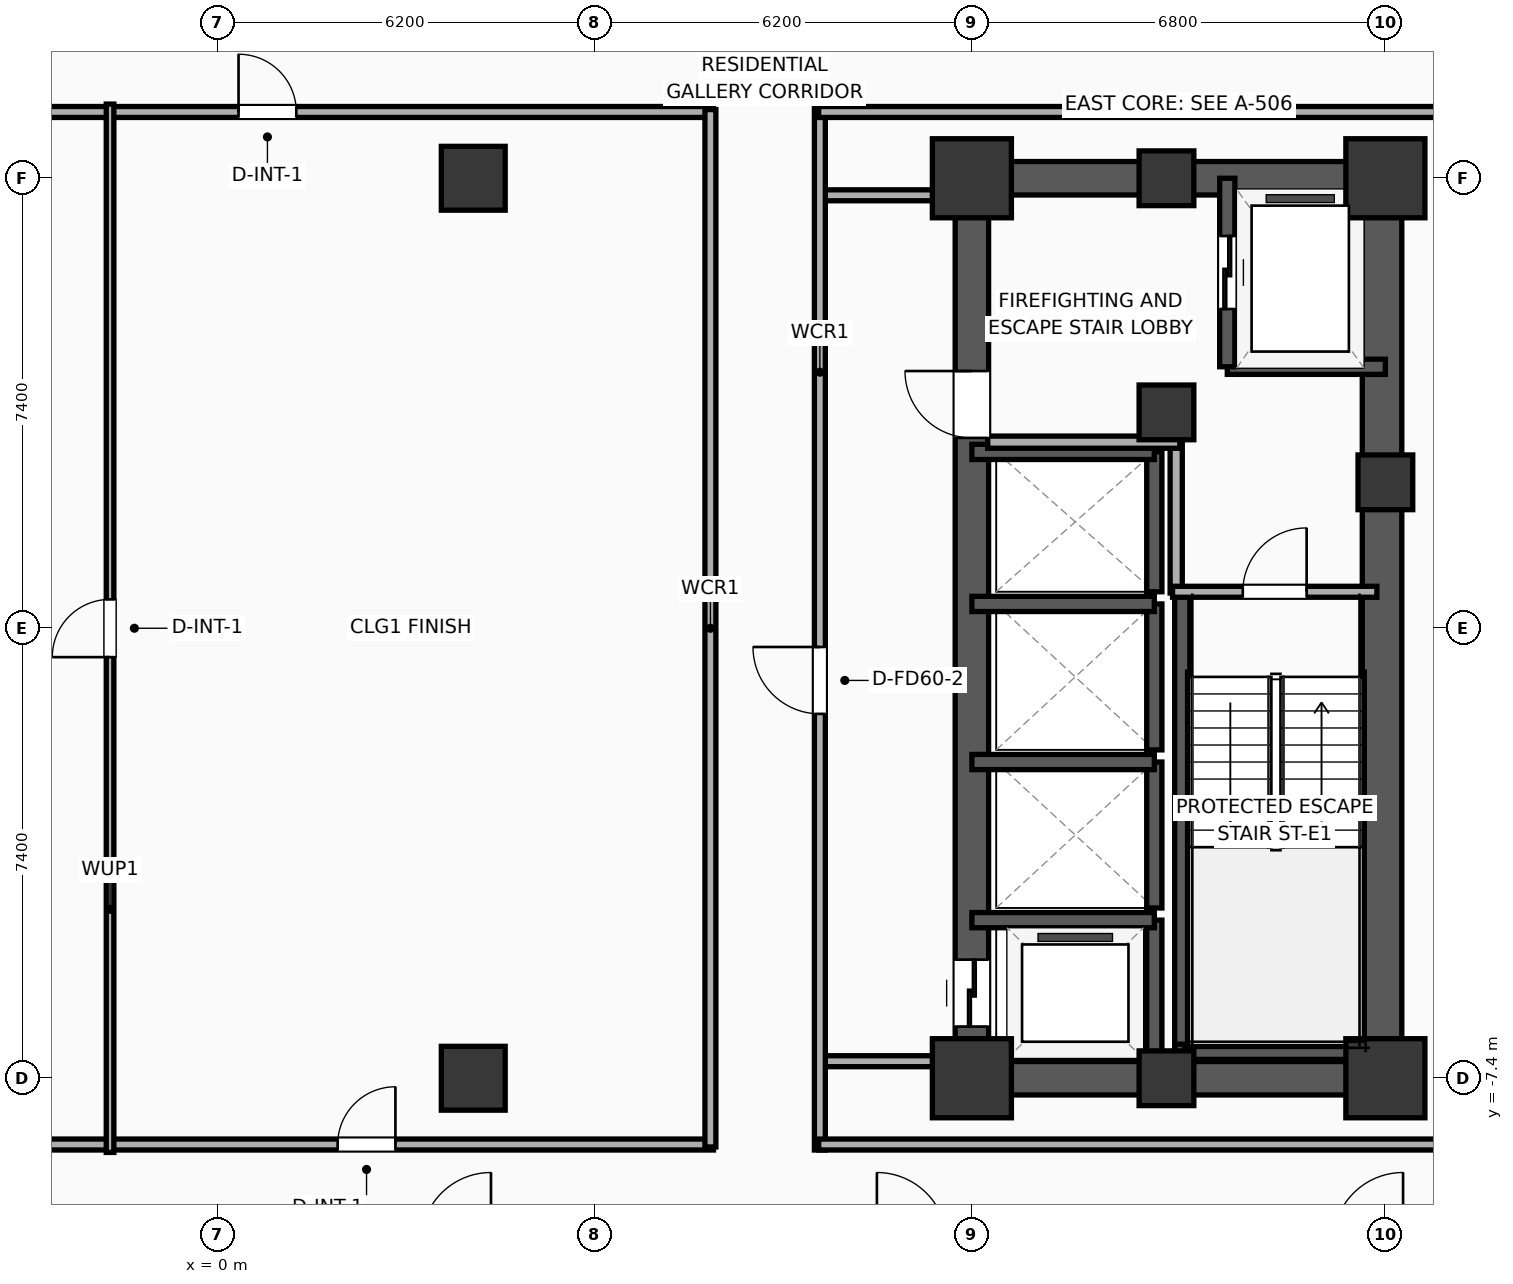
"""IFC4 building model, lengths in metres.
Left out: names, types, materials, properties, quantities, classifications, styles, units other than length and angle.
Written with IfcOpenShell. Run it as: python <this file> out.ifc"""

import sys

from ifc_helpers import new_model, si_unit, direction, frame, frame_2d, origin, origin_2d, place, context, subcontext, project, spatial, rectangle, extrude, element, fill, save


model = new_model("IFC4")
c1 = context("Model", 3, precision=1e-05, world=origin(), true_north=direction((0.0, 1.0)))
c2 = subcontext(c1, "Body", "Model", "MODEL_VIEW")
j1 = project(units=[si_unit("LENGTHUNIT", "METRE"), si_unit("PLANEANGLEUNIT", "RADIAN")], contexts=[c1])
p1 = place(None, origin())
s1 = spatial("IfcSite", under=j1, at=p1, CompositionType="ELEMENT")
p2 = place(p1, origin())
s2 = spatial("IfcBuilding", under=s1, at=p2, CompositionType="ELEMENT")
p3 = place(p2, frame((0.0, 0.0, 136.5)))
s3 = spatial("IfcBuildingStorey", under=s2, at=p3, CompositionType="ELEMENT", Elevation=136.5)
p4 = place(p3, frame((12.4, -7.4, 0.0), z_axis=(0.0, 0.0, 1.0), x_axis=(1.0, 0.0, 0.0)))
e1 = element("IfcColumn", 1, at=p4, inside=s3, PredefinedType="COLUMN", context=c2, shape_type="SweptSolid", body=[
    extrude(rectangle(XDim=1.3, YDim=1.3, at=origin_2d()), origin(), (0.0, 0.0, 1.0), 3.9),
])
p5 = place(p3, frame((15.6, 3.55, 0.0), z_axis=(0.0, 0.0, 1.0), x_axis=(1.0, 0.0, 0.0)))
e2 = element("IfcColumn", 2, at=p5, inside=s3, PredefinedType="COLUMN", context=c2, shape_type="SweptSolid", body=[
    extrude(rectangle(XDim=0.9, YDim=0.9, at=origin_2d()), origin(), (0.0, 0.0, 1.0), 3.9),
])
p6 = place(p3, frame((12.4, 7.4, 0.0), z_axis=(0.0, 0.0, 1.0), x_axis=(1.0, 0.0, 0.0)))
e3 = element("IfcColumn", 3, at=p6, inside=s3, PredefinedType="COLUMN", context=c2, shape_type="SweptSolid", body=[
    extrude(rectangle(XDim=1.3, YDim=1.3, at=origin_2d()), origin(), (0.0, 0.0, 1.0), 3.9),
])
for number, where, z_axis, x_axis in (
    (4, (15.6, -7.4, 0.0), (0.0, 0.0, 1.0), (1.0, 0.0, 0.0)),
    (5, (15.6, 7.4, 0.0), (0.0, 0.0, 1.0), (1.0, 0.0, 0.0)),
):
    element("IfcColumn", number, at=place(p3, frame(where, z_axis=z_axis, x_axis=x_axis)), inside=s3, PredefinedType="COLUMN", context=c2, shape_type="SweptSolid", body=[
        extrude(rectangle(XDim=0.9, YDim=0.9, at=origin_2d()), origin(), (0.0, 0.0, 1.0), 3.9),
    ])
p7 = place(p3, frame((19.2, -7.4, 0.0), z_axis=(0.0, 0.0, 1.0), x_axis=(1.0, 0.0, 0.0)))
e6 = element("IfcColumn", 6, at=p7, inside=s3, PredefinedType="COLUMN", context=c2, shape_type="SweptSolid", body=[
    extrude(rectangle(XDim=1.3, YDim=1.3, at=origin_2d()), origin(), (0.0, 0.0, 1.0), 3.9),
])
p8 = place(p3, frame((19.2, 2.4, 0.0), z_axis=(0.0, 0.0, 1.0), x_axis=(1.0, 0.0, 0.0)))
e7 = element("IfcColumn", 7, at=p8, inside=s3, PredefinedType="COLUMN", context=c2, shape_type="SweptSolid", body=[
    extrude(rectangle(XDim=0.9, YDim=0.9, at=origin_2d()), origin(), (0.0, 0.0, 1.0), 3.9),
])
p9 = place(p3, frame((19.2, 7.4, 0.0), z_axis=(0.0, 0.0, 1.0), x_axis=(1.0, 0.0, 0.0)))
e8 = element("IfcColumn", 8, at=p9, inside=s3, PredefinedType="COLUMN", context=c2, shape_type="SweptSolid", body=[
    extrude(rectangle(XDim=1.3, YDim=1.3, at=origin_2d()), origin(), (0.0, 0.0, 1.0), 3.9),
])
for number, where, z_axis, x_axis in (
    (9, (12.125, -7.4, 0.0), (0.0, 0.0, 1.0), (1.0, 0.0, 0.0)),
    (10, (12.125, 7.4, 0.0), (0.0, 0.0, 1.0), (1.0, 0.0, 0.0)),
):
    element("IfcWall", number, at=place(p3, frame(where, z_axis=z_axis, x_axis=x_axis)), inside=s3, PredefinedType="SHEAR", context=c2, shape_type="SweptSolid", body=[
        extrude(rectangle(XDim=7.35, YDim=0.55, at=frame_2d((3.675, 0.0))), origin(), (0.0, 0.0, 1.0), 3.5),
    ])
p10 = place(p3, frame((12.4, -7.4, 0.0), z_axis=(0.0, 0.0, 1.0), x_axis=(0.0, 1.0, 0.0)))
e11 = element("IfcWall", 11, at=p10, inside=s3, PredefinedType="SHEAR", context=c2, shape_type="SweptSolid", body=[
    extrude(rectangle(XDim=14.8, YDim=0.55, at=frame_2d((7.4, 0.0))), origin(), (0.0, 0.0, 1.0), 3.5),
])
p11 = place(p10, frame((0.85, 0.0, 0.0)))
e12 = element("IfcOpeningElement", 12, at=p11, cuts=e11, PredefinedType="OPENING", context=c2, shape_type="SweptSolid", body=[
    extrude(rectangle(XDim=1.1, YDim=2.05, at=frame_2d((0.55, 1.025))), frame((0.0, 0.285, 0.0), z_axis=(0.0, -1.0, 0.0), x_axis=(1.0, 0.0, 0.0)), (0.0, 0.0, 1.0), 0.57),
])
p12 = place(p10, frame((10.53, 0.0, 0.0)))
e13 = element("IfcOpeningElement", 13, at=p12, cuts=e11, PredefinedType="OPENING", context=c2, shape_type="SweptSolid", body=[
    extrude(rectangle(XDim=1.1, YDim=2.05, at=frame_2d((0.55, 1.025))), frame((0.0, 0.285, 0.0), z_axis=(0.0, -1.0, 0.0), x_axis=(1.0, 0.0, 0.0)), (0.0, 0.0, 1.0), 0.57),
])
p13 = place(p3, frame((19.145, -7.4, 0.0), z_axis=(0.0, 0.0, 1.0), x_axis=(0.0, 1.0, 0.0)))
e14 = element("IfcWall", 14, at=p13, inside=s3, PredefinedType="SHEAR", context=c2, shape_type="SweptSolid", body=[
    extrude(rectangle(XDim=14.8, YDim=0.65, at=frame_2d((7.4, 0.0))), origin(), (0.0, 0.0, 1.0), 3.5),
])
p14 = place(p3, frame((15.86, -7.085, 0.0), z_axis=(0.0, 0.0, 1.0), x_axis=(0.0, 1.0, 0.0)))
e15 = element("IfcWall", 15, at=p14, inside=s3, PredefinedType="SOLIDWALL", context=c2, shape_type="SweptSolid", body=[
    extrude(rectangle(XDim=7.685, YDim=0.25, at=frame_2d((3.843, 0.0))), origin(), (0.0, 0.0, 1.0), 3.5),
])
p15 = place(p3, frame((15.74, -6.965, 0.0), z_axis=(0.0, 0.0, 1.0), x_axis=(1.0, 0.0, 0.0)))
e16 = element("IfcWall", 16, at=p15, inside=s3, PredefinedType="SOLIDWALL", context=c2, shape_type="SweptSolid", body=[
    extrude(rectangle(XDim=3.46, YDim=0.25, at=frame_2d((1.73, 0.0))), origin(), (0.0, 0.0, 1.0), 3.5),
])
for number, where, z_axis, x_axis in (
    (17, (4.2, -7.4, 0.0), (0.0, 0.0, 1.0), (1.0, 0.0, 0.0)),
    (18, (4.2, 7.4, 0.0), (0.0, 0.0, 1.0), (1.0, 0.0, 0.0)),
):
    element("IfcColumn", number, at=place(p3, frame(where, z_axis=z_axis, x_axis=x_axis)), inside=s3, PredefinedType="COLUMN", context=c2, shape_type="SweptSolid", body=[
        extrude(rectangle(XDim=1.05, YDim=1.05, at=origin_2d()), origin(), (0.0, 0.0, 1.0), 3.9),
    ])
p16 = place(p3, frame((16.6, 4.3, 0.0), z_axis=(0.0, 0.0, 1.0), x_axis=(1.0, 0.0, 0.0)))
e19 = element("IfcWall", 19, at=p16, inside=s3, PredefinedType="SOLIDWALL", context=c2, shape_type="SweptSolid", body=[
    extrude(rectangle(XDim=2.6, YDim=0.25, at=frame_2d((1.3, 0.0))), origin(), (0.0, 0.0, 1.0), 3.5),
])
p17 = place(p3, frame((16.6, 7.4, 0.0), z_axis=(0.0, 0.0, 1.0), x_axis=(0.0, -1.0, 0.0)))
e20 = element("IfcWall", 20, at=p17, inside=s3, PredefinedType="SOLIDWALL", context=c2, shape_type="SweptSolid", body=[
    extrude(rectangle(XDim=3.1, YDim=0.25, at=frame_2d((1.55, 0.0))), origin(), (0.0, 0.0, 1.0), 3.5),
])
p18 = place(p17, frame((0.95, 0.0, 0.0)))
e21 = element("IfcOpeningElement", 21, at=p18, cuts=e20, PredefinedType="OPENING", context=c2, shape_type="SweptSolid", body=[
    extrude(rectangle(XDim=1.2, YDim=2.05, at=frame_2d((0.6, 1.025))), frame((0.0, 0.135, 0.0), z_axis=(0.0, -1.0, 0.0), x_axis=(1.0, 0.0, 0.0)), (0.0, 0.0, 1.0), 0.27),
])
p19 = place(p3, frame((15.4, -7.4, 0.0), z_axis=(0.0, 0.0, 1.0), x_axis=(0.0, 1.0, 0.0)))
e22 = element("IfcWall", 22, at=p19, inside=s3, PredefinedType="SOLIDWALL", context=c2, shape_type="SweptSolid", body=[
    extrude(rectangle(XDim=2.6, YDim=0.25, at=frame_2d((1.3, 0.0))), origin(), (0.0, 0.0, 1.0), 3.5),
])
p20 = place(p3, frame((15.4, -4.8, 0.0), z_axis=(0.0, 0.0, 1.0), x_axis=(-1.0, 0.0, 0.0)))
e23 = element("IfcWall", 23, at=p20, inside=s3, PredefinedType="SOLIDWALL", context=c2, shape_type="SweptSolid", body=[
    extrude(rectangle(XDim=3.0, YDim=0.25, at=frame_2d((1.5, 0.0))), origin(), (0.0, 0.0, 1.0), 3.5),
])
p21 = place(p3, frame((15.4, -4.6, 0.0), z_axis=(0.0, 0.0, 1.0), x_axis=(0.0, 1.0, 0.0)))
e24 = element("IfcWall", 24, at=p21, inside=s3, PredefinedType="SOLIDWALL", context=c2, shape_type="SweptSolid", body=[
    extrude(rectangle(XDim=2.4, YDim=0.25, at=frame_2d((1.2, 0.0))), origin(), (0.0, 0.0, 1.0), 3.5),
])
p22 = place(p3, frame((15.4, -2.2, 0.0), z_axis=(0.0, 0.0, 1.0), x_axis=(-1.0, 0.0, 0.0)))
e25 = element("IfcWall", 25, at=p22, inside=s3, PredefinedType="SOLIDWALL", context=c2, shape_type="SweptSolid", body=[
    extrude(rectangle(XDim=3.0, YDim=0.25, at=frame_2d((1.5, 0.0))), origin(), (0.0, 0.0, 1.0), 3.5),
])
p23 = place(p3, frame((15.4, -2.0, 0.0), z_axis=(0.0, 0.0, 1.0), x_axis=(0.0, 1.0, 0.0)))
e26 = element("IfcWall", 26, at=p23, inside=s3, PredefinedType="SOLIDWALL", context=c2, shape_type="SweptSolid", body=[
    extrude(rectangle(XDim=2.4, YDim=0.25, at=frame_2d((1.2, 0.0))), origin(), (0.0, 0.0, 1.0), 3.5),
])
p24 = place(p3, frame((15.4, 0.4, 0.0), z_axis=(0.0, 0.0, 1.0), x_axis=(-1.0, 0.0, 0.0)))
e27 = element("IfcWall", 27, at=p24, inside=s3, PredefinedType="SOLIDWALL", context=c2, shape_type="SweptSolid", body=[
    extrude(rectangle(XDim=3.0, YDim=0.25, at=frame_2d((1.5, 0.0))), origin(), (0.0, 0.0, 1.0), 3.5),
])
p25 = place(p3, frame((15.4, 0.6, 0.0), z_axis=(0.0, 0.0, 1.0), x_axis=(0.0, 1.0, 0.0)))
e28 = element("IfcWall", 28, at=p25, inside=s3, PredefinedType="SOLIDWALL", context=c2, shape_type="SweptSolid", body=[
    extrude(rectangle(XDim=2.3, YDim=0.25, at=frame_2d((1.15, 0.0))), origin(), (0.0, 0.0, 1.0), 3.5),
])
p26 = place(p3, frame((15.4, 2.9, 0.0), z_axis=(0.0, 0.0, 1.0), x_axis=(-1.0, 0.0, 0.0)))
e29 = element("IfcWall", 29, at=p26, inside=s3, PredefinedType="SOLIDWALL", context=c2, shape_type="SweptSolid", body=[
    extrude(rectangle(XDim=3.0, YDim=0.25, at=frame_2d((1.5, 0.0))), origin(), (0.0, 0.0, 1.0), 3.5),
])
p27 = place(p3, frame((15.76, 0.58, 0.0), z_axis=(0.0, 0.0, 1.0), x_axis=(0.0, 1.0, 0.0)))
e30 = element("IfcWall", 30, at=p27, inside=s3, PredefinedType="PARTITIONING", context=c2, shape_type="SweptSolid", body=[
    extrude(rectangle(XDim=2.52, YDim=0.2, at=frame_2d((1.26, 0.0))), origin(), (0.0, 0.0, 1.0), 3.5),
])
p28 = place(p3, frame((12.66, 3.06, 0.0), z_axis=(0.0, 0.0, 1.0), x_axis=(1.0, 0.0, 0.0)))
e31 = element("IfcWall", 31, at=p28, inside=s3, PredefinedType="PARTITIONING", context=c2, shape_type="SweptSolid", body=[
    extrude(rectangle(XDim=3.16, YDim=0.2, at=frame_2d((1.58, 0.0))), origin(), (0.0, 0.0, 1.0), 3.5),
])
p29 = place(p3, frame((15.7, 0.6, 0.0), z_axis=(0.0, 0.0, 1.0), x_axis=(1.0, 0.0, 0.0)))
e32 = element("IfcWall", 32, at=p29, inside=s3, PredefinedType="PARTITIONING", context=c2, shape_type="SweptSolid", body=[
    extrude(rectangle(XDim=3.36, YDim=0.18, at=frame_2d((1.68, 0.0))), origin(), (0.0, 0.0, 1.0), 3.5),
])
p30 = place(p29, frame((1.155, 0.0, 0.0)))
e33 = element("IfcOpeningElement", 33, at=p30, cuts=e32, PredefinedType="OPENING", context=c2, shape_type="SweptSolid", body=[
    extrude(rectangle(XDim=1.05, YDim=2.05, at=frame_2d((0.525, 1.025))), frame((0.0, 0.1, 0.0), z_axis=(0.0, -1.0, 0.0), x_axis=(1.0, 0.0, 0.0)), (0.0, 0.0, 1.0), 0.2),
])
for number, where, z_axis, x_axis in (
    (34, (9.88, 7.12, 0.0), (0.0, 0.0, 1.0), (1.0, 0.0, 0.0)),
    (35, (9.88, -7.12, 0.0), (0.0, 0.0, 1.0), (1.0, 0.0, 0.0)),
):
    element("IfcWall", number, at=place(p3, frame(where, z_axis=z_axis, x_axis=x_axis)), inside=s3, PredefinedType="PARTITIONING", context=c2, shape_type="SweptSolid", body=[
        extrude(rectangle(XDim=2.27, YDim=0.18, at=frame_2d((1.135, 0.0))), origin(), (0.0, 0.0, 1.0), 2.54),
    ])
p31 = place(p3, frame((9.9, -8.58, 0.0), z_axis=(0.0, 0.0, 1.0), x_axis=(0.0, 1.0, 0.0)))
e36 = element("IfcWall", 36, at=p31, inside=s3, PredefinedType="PARTITIONING", context=c2, shape_type="SweptSolid", body=[
    extrude(rectangle(XDim=17.16, YDim=0.18, at=frame_2d((8.58, 0.0))), origin(), (0.0, 0.0, 1.0), 3.5),
])
p32 = place(p31, frame((7.172, 0.0, 0.0)))
e37 = element("IfcOpeningElement", 37, at=p32, cuts=e36, PredefinedType="OPENING", context=c2, shape_type="SweptSolid", body=[
    extrude(rectangle(XDim=1.1, YDim=2.05, at=frame_2d((0.55, 1.025))), frame((0.0, 0.1, 0.0), z_axis=(0.0, -1.0, 0.0), x_axis=(1.0, 0.0, 0.0)), (0.0, 0.0, 1.0), 0.2),
])
p33 = place(p3, frame((9.88, 8.49, 0.0), z_axis=(0.0, 0.0, 1.0), x_axis=(1.0, 0.0, 0.0)))
e38 = element("IfcWall", 38, at=p33, inside=s3, PredefinedType="PARTITIONING", context=c2, shape_type="SweptSolid", body=[
    extrude(rectangle(XDim=23.33, YDim=0.18, at=frame_2d((11.665, 0.0))), origin(), (0.0, 0.0, 1.0), 2.39),
])
p34 = place(p33, frame((17.739, 0.0, 0.0)))
e39 = element("IfcOpeningElement", 39, at=p34, cuts=e38, PredefinedType="OPENING", context=c2, shape_type="SweptSolid", body=[
    extrude(rectangle(XDim=1.15, YDim=2.05, at=frame_2d((0.575, 1.025))), frame((0.0, 0.1, 0.0), z_axis=(0.0, -1.0, 0.0), x_axis=(1.0, 0.0, 0.0)), (0.0, 0.0, 1.0), 0.2),
])
p35 = place(p3, frame((9.88, -8.49, 0.0), z_axis=(0.0, 0.0, 1.0), x_axis=(1.0, 0.0, 0.0)))
e40 = element("IfcWall", 40, at=p35, inside=s3, PredefinedType="PARTITIONING", context=c2, shape_type="SweptSolid", body=[
    extrude(rectangle(XDim=23.33, YDim=0.18, at=frame_2d((11.665, 0.0))), origin(), (0.0, 0.0, 1.0), 3.5),
])
p36 = place(p3, frame((-8.15, 8.49, 0.0), z_axis=(0.0, 0.0, 1.0), x_axis=(1.0, 0.0, 0.0)))
e41 = element("IfcWall", 41, at=p36, inside=s3, PredefinedType="PARTITIONING", context=c2, shape_type="SweptSolid", body=[
    extrude(rectangle(XDim=16.3, YDim=0.18, at=frame_2d((8.15, 0.0))), origin(), (0.0, 0.0, 1.0), 3.5),
])
p37 = place(p36, frame((8.49, 0.0, 0.0)))
e42 = element("IfcOpeningElement", 42, at=p37, cuts=e41, PredefinedType="OPENING", context=c2, shape_type="SweptSolid", body=[
    extrude(rectangle(XDim=0.95, YDim=2.05, at=frame_2d((0.475, 1.025))), frame((0.0, 0.1, 0.0), z_axis=(0.0, -1.0, 0.0), x_axis=(1.0, 0.0, 0.0)), (0.0, 0.0, 1.0), 0.2),
])
p38 = place(p3, frame((-8.15, -8.49, 0.0), z_axis=(0.0, 0.0, 1.0), x_axis=(1.0, 0.0, 0.0)))
e43 = element("IfcWall", 43, at=p38, inside=s3, PredefinedType="PARTITIONING", context=c2, shape_type="SweptSolid", body=[
    extrude(rectangle(XDim=16.3, YDim=0.18, at=frame_2d((8.15, 0.0))), origin(), (0.0, 0.0, 1.0), 3.5),
])
p39 = place(p38, frame((1.13, 0.0, 0.0)))
e44 = element("IfcOpeningElement", 44, at=p39, cuts=e43, PredefinedType="OPENING", context=c2, shape_type="SweptSolid", body=[
    extrude(rectangle(XDim=1.0, YDim=2.05, at=frame_2d((0.5, 1.025))), frame((0.0, 0.1, 0.0), z_axis=(0.0, -1.0, 0.0), x_axis=(1.0, 0.0, 0.0)), (0.0, 0.0, 1.0), 0.2),
])
p40 = place(p38, frame((10.12, 0.0, 0.0)))
e45 = element("IfcOpeningElement", 45, at=p40, cuts=e43, PredefinedType="OPENING", context=c2, shape_type="SweptSolid", body=[
    extrude(rectangle(XDim=0.95, YDim=2.05, at=frame_2d((0.475, 1.025))), frame((0.0, 0.1, 0.0), z_axis=(0.0, -1.0, 0.0), x_axis=(1.0, 0.0, 0.0)), (0.0, 0.0, 1.0), 0.2),
])
p41 = place(p3, frame((8.1, -8.53, 0.0), z_axis=(0.0, 0.0, 1.0), x_axis=(0.0, 1.0, 0.0)))
e46 = element("IfcWall", 46, at=p41, inside=s3, PredefinedType="PARTITIONING", context=c2, shape_type="SweptSolid", body=[
    extrude(rectangle(XDim=17.06, YDim=0.18, at=frame_2d((8.53, 0.0))), origin(), (0.0, 0.0, 1.0), 3.5),
])
p42 = place(p3, frame((-1.773, -8.62, 0.0), z_axis=(0.0, 0.0, 1.0), x_axis=(0.0, 1.0, 0.0)))
e47 = element("IfcWall", 47, at=p42, inside=s3, PredefinedType="PARTITIONING", context=c2, shape_type="SweptSolid", body=[
    extrude(rectangle(XDim=17.24, YDim=0.125, at=frame_2d((8.62, 0.0))), origin(), (0.0, 0.0, 1.0), 3.5),
])
p43 = place(p42, frame((8.145, 0.0, 0.0)))
e48 = element("IfcOpeningElement", 48, at=p43, cuts=e47, PredefinedType="OPENING", context=c2, shape_type="SweptSolid", body=[
    extrude(rectangle(XDim=0.95, YDim=2.05, at=frame_2d((0.475, 1.025))), frame((0.0, 0.073, 0.0), z_axis=(0.0, -1.0, 0.0), x_axis=(1.0, 0.0, 0.0)), (0.0, 0.0, 1.0), 0.145),
])
p44 = place(p18, origin())
e49 = element("IfcDoor", 49, at=p44, inside=s3, OperationType="SLIDING_TO_LEFT", PredefinedType="DOOR", context=c2, shape_type="SweptSolid", body=[
    extrude(rectangle(XDim=1.2, YDim=2.05, at=frame_2d((0.6, 1.025))), frame((0.0, 0.025, 0.0), z_axis=(0.0, -1.0, 0.0), x_axis=(1.0, 0.0, 0.0)), (0.0, 0.0, 1.0), 0.05),
])
fill(e21, e49)
p45 = place(p11, origin())
e50 = element("IfcDoor", 50, at=p45, inside=s3, OperationType="SLIDING_TO_LEFT", PredefinedType="DOOR", context=c2, shape_type="SweptSolid", body=[
    extrude(rectangle(XDim=1.1, YDim=2.05, at=frame_2d((0.55, 1.025))), frame((0.0, 0.025, 0.0), z_axis=(0.0, -1.0, 0.0), x_axis=(1.0, 0.0, 0.0)), (0.0, 0.0, 1.0), 0.05),
])
fill(e12, e50)
p46 = place(p30, origin())
e51 = element("IfcDoor", 51, at=p46, inside=s3, OperationType="SINGLE_SWING_RIGHT", PredefinedType="DOOR", context=c2, shape_type="SweptSolid", body=[
    extrude(rectangle(XDim=1.05, YDim=2.05, at=frame_2d((0.525, 1.025))), frame((0.0, 0.025, 0.0), z_axis=(0.0, -1.0, 0.0), x_axis=(1.0, 0.0, 0.0)), (0.0, 0.0, 1.0), 0.05),
])
fill(e33, e51)
p47 = place(p32, origin())
e52 = element("IfcDoor", 52, at=p47, inside=s3, OperationType="SINGLE_SWING_RIGHT", PredefinedType="DOOR", context=c2, shape_type="SweptSolid", body=[
    extrude(rectangle(XDim=1.1, YDim=2.05, at=frame_2d((0.55, 1.025))), frame((0.0, 0.025, 0.0), z_axis=(0.0, -1.0, 0.0), x_axis=(1.0, 0.0, 0.0)), (0.0, 0.0, 1.0), 0.05),
])
fill(e37, e52)
p48 = place(p37, origin())
e53 = element("IfcDoor", 53, at=p48, inside=s3, OperationType="SINGLE_SWING_LEFT", PredefinedType="DOOR", context=c2, shape_type="SweptSolid", body=[
    extrude(rectangle(XDim=0.95, YDim=2.05, at=frame_2d((0.475, 1.025))), frame((0.0, 0.025, 0.0), z_axis=(0.0, -1.0, 0.0), x_axis=(1.0, 0.0, 0.0)), (0.0, 0.0, 1.0), 0.05),
])
fill(e42, e53)
p49 = place(p40, origin())
e54 = element("IfcDoor", 54, at=p49, inside=s3, OperationType="SINGLE_SWING_RIGHT", PredefinedType="DOOR", context=c2, shape_type="SweptSolid", body=[
    extrude(rectangle(XDim=0.95, YDim=2.05, at=frame_2d((0.475, 1.025))), frame((0.0, 0.025, 0.0), z_axis=(0.0, -1.0, 0.0), x_axis=(1.0, 0.0, 0.0)), (0.0, 0.0, 1.0), 0.05),
])
fill(e45, e54)
p50 = place(p43, origin())
e55 = element("IfcDoor", 55, at=p50, inside=s3, OperationType="SINGLE_SWING_LEFT", PredefinedType="DOOR", context=c2, shape_type="SweptSolid", body=[
    extrude(rectangle(XDim=0.95, YDim=2.05, at=frame_2d((0.475, 1.025))), frame((0.0, 0.025, 0.0), z_axis=(0.0, -1.0, 0.0), x_axis=(1.0, 0.0, 0.0)), (0.0, 0.0, 1.0), 0.05),
])
fill(e48, e55)
p51 = place(p12, origin())
e56 = element("IfcDoor", 56, at=p51, inside=s3, OperationType="SINGLE_SWING_RIGHT", PredefinedType="DOOR", context=c2, shape_type="SweptSolid", body=[
    extrude(rectangle(XDim=1.1, YDim=2.05, at=frame_2d((0.55, 1.025))), frame((0.0, 0.025, 0.0), z_axis=(0.0, -1.0, 0.0), x_axis=(1.0, 0.0, 0.0)), (0.0, 0.0, 1.0), 0.05),
])
fill(e13, e56)
save(model, sys.argv[1])
